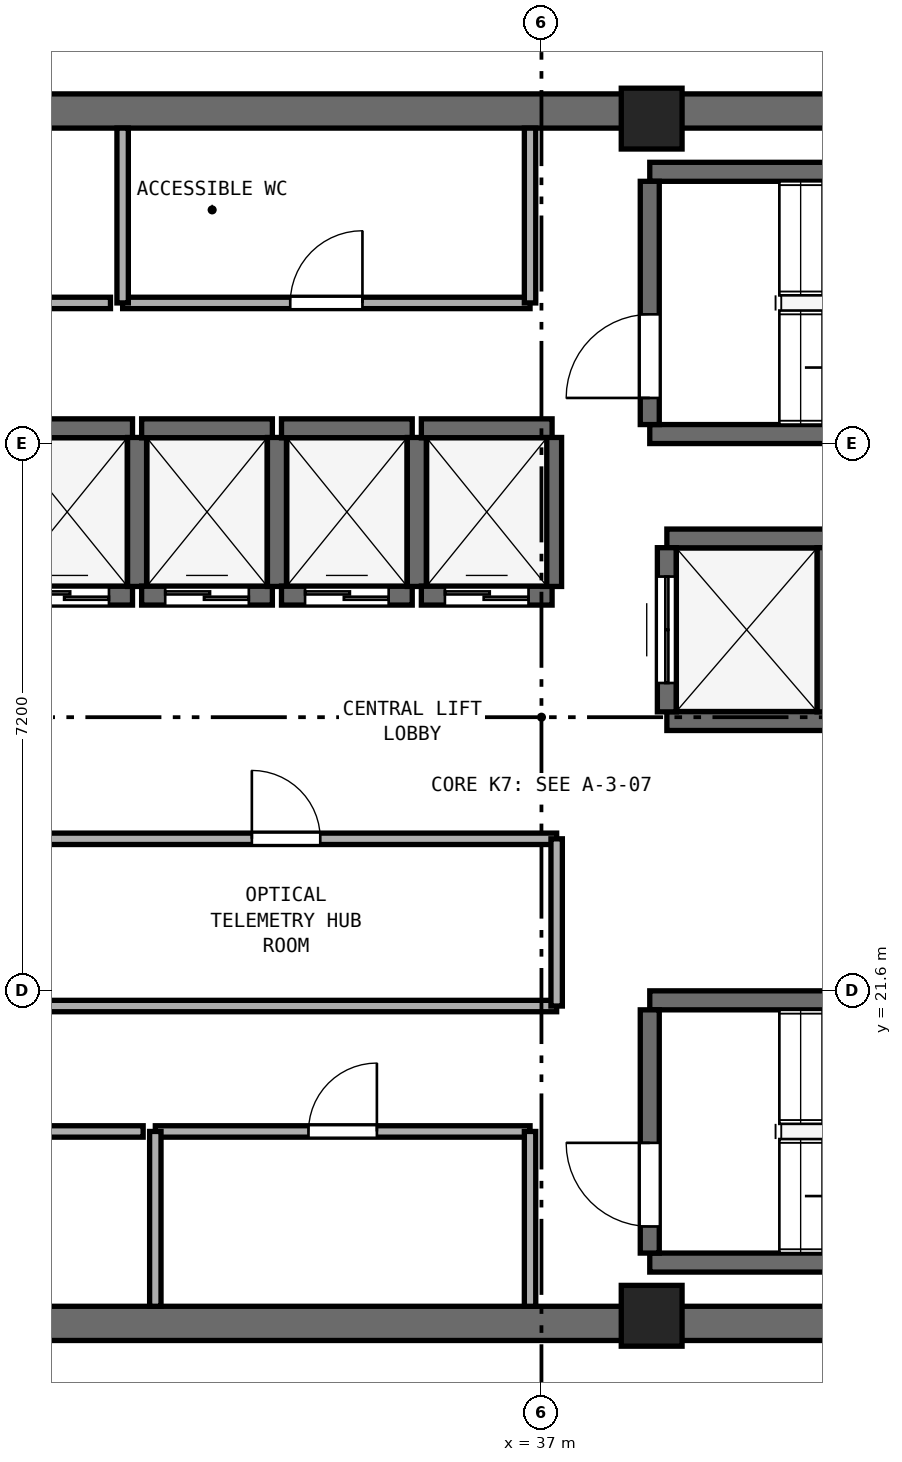
"""IFC4 building model, lengths in metres.
Left out: names, types, materials, properties, quantities, classifications, styles, units other than length and angle.
Written with IfcOpenShell. Run it as: python <this file> out.ifc"""

import sys

from ifc_helpers import new_model, si_unit, direction, frame, frame_2d, origin, origin_2d, place, context, subcontext, project, spatial, rectangle, extrude, element, fill, save


model = new_model("IFC4")
c1 = context("Model", 3, precision=1e-05, world=origin(), true_north=direction((0.0, 1.0)))
c2 = subcontext(c1, "Body", "Model", "MODEL_VIEW")
j1 = project(units=[si_unit("LENGTHUNIT", "METRE"), si_unit("PLANEANGLEUNIT", "RADIAN")], contexts=[c1])
p1 = place(None, origin())
s1 = spatial("IfcSite", under=j1, at=p1, CompositionType="ELEMENT")
p2 = place(p1, origin())
s2 = spatial("IfcBuilding", under=s1, at=p2, CompositionType="ELEMENT")
p3 = place(p2, frame((0.0, 0.0, 297.2)))
s3 = spatial("IfcBuildingStorey", under=s2, at=p3, CompositionType="ELEMENT", Elevation=297.2)
for number, where, z_axis, x_axis in (
    (1, (25.4, 17.225, 0.0), (0.0, 0.0, 1.0), (1.0, 0.0, 0.0)),
    (2, (25.4, 33.175, 0.0), (0.0, 0.0, 1.0), (1.0, 0.0, 0.0)),
):
    element("IfcWall", number, at=place(p3, frame(where, z_axis=z_axis, x_axis=x_axis)), inside=s3, PredefinedType="SHEAR", context=c2, shape_type="SweptSolid", body=[
        extrude(rectangle(XDim=23.2, YDim=0.45, at=frame_2d((11.6, 0.0))), origin(), (0.0, 0.0, 1.0), 3.54),
    ])
for number, where, z_axis, x_axis in (
    (3, (38.45, 17.325, 0.0), (0.0, 0.0, 1.0), (1.0, 0.0, 0.0)),
    (4, (38.45, 33.075, 0.0), (0.0, 0.0, 1.0), (1.0, 0.0, 0.0)),
):
    element("IfcColumn", number, at=place(p3, frame(where, z_axis=z_axis, x_axis=x_axis)), inside=s3, PredefinedType="PILASTER", context=c2, shape_type="SweptSolid", body=[
        extrude(rectangle(XDim=0.8, YDim=0.8, at=origin_2d()), origin(), (0.0, 0.0, 1.0), 3.8),
    ])
for number, where, z_axis, x_axis in (
    (5, (38.425, 28.925, 0.0), (0.0, 0.0, 1.0), (1.0, 0.0, 0.0)),
    (6, (38.425, 32.375, 0.0), (0.0, 0.0, 1.0), (1.0, 0.0, 0.0)),
):
    element("IfcWall", number, at=place(p3, frame(where, z_axis=z_axis, x_axis=x_axis)), inside=s3, PredefinedType="SHEAR", context=c2, shape_type="SweptSolid", body=[
        extrude(rectangle(XDim=7.3, YDim=0.25, at=frame_2d((3.65, 0.0))), origin(), (0.0, 0.0, 1.0), 3.54),
    ])
p4 = place(p3, frame((38.425, 29.05, 0.0), z_axis=(0.0, 0.0, 1.0), x_axis=(0.0, 1.0, 0.0)))
e7 = element("IfcWall", 7, at=p4, inside=s3, PredefinedType="SHEAR", context=c2, shape_type="SweptSolid", body=[
    extrude(rectangle(XDim=3.2, YDim=0.25, at=frame_2d((1.6, 0.0))), origin(), (0.0, 0.0, 1.0), 3.54),
])
p5 = place(p4, frame((0.35, 0.0, 0.0)))
e8 = element("IfcOpeningElement", 8, at=p5, cuts=e7, PredefinedType="OPENING", context=c2, shape_type="SweptSolid", body=[
    extrude(rectangle(XDim=1.1, YDim=2.15, at=frame_2d((0.55, 1.075))), frame((0.0, 0.135, 0.0), z_axis=(0.0, -1.0, 0.0), x_axis=(1.0, 0.0, 0.0)), (0.0, 0.0, 1.0), 0.27),
])
for number, where, z_axis, x_axis in (
    (9, (38.425, 18.025, 0.0), (0.0, 0.0, 1.0), (1.0, 0.0, 0.0)),
    (10, (38.425, 21.475, 0.0), (0.0, 0.0, 1.0), (1.0, 0.0, 0.0)),
):
    element("IfcWall", number, at=place(p3, frame(where, z_axis=z_axis, x_axis=x_axis)), inside=s3, PredefinedType="SHEAR", context=c2, shape_type="SweptSolid", body=[
        extrude(rectangle(XDim=7.3, YDim=0.25, at=frame_2d((3.65, 0.0))), origin(), (0.0, 0.0, 1.0), 3.54),
    ])
p6 = place(p3, frame((38.425, 18.15, 0.0), z_axis=(0.0, 0.0, 1.0), x_axis=(0.0, 1.0, 0.0)))
e11 = element("IfcWall", 11, at=p6, inside=s3, PredefinedType="SHEAR", context=c2, shape_type="SweptSolid", body=[
    extrude(rectangle(XDim=3.2, YDim=0.25, at=frame_2d((1.6, 0.0))), origin(), (0.0, 0.0, 1.0), 3.54),
])
p7 = place(p6, frame((0.35, 0.0, 0.0)))
e12 = element("IfcOpeningElement", 12, at=p7, cuts=e11, PredefinedType="OPENING", context=c2, shape_type="SweptSolid", body=[
    extrude(rectangle(XDim=1.1, YDim=2.15, at=frame_2d((0.55, 1.075))), frame((0.0, 0.135, 0.0), z_axis=(0.0, -1.0, 0.0), x_axis=(1.0, 0.0, 0.0)), (0.0, 0.0, 1.0), 0.27),
])
p8 = place(p3, frame((29.9, 26.8, 0.0), z_axis=(0.0, 0.0, 1.0), x_axis=(1.0, 0.0, 0.0)))
e13 = element("IfcWall", 13, at=p8, inside=s3, PredefinedType="SHEAR", context=c2, shape_type="SweptSolid", body=[
    extrude(rectangle(XDim=1.72, YDim=0.25, at=frame_2d((0.86, 0.0))), origin(), (0.0, 0.0, 1.0), 3.54),
])
p9 = place(p8, frame((0.31, 0.0, 0.0)))
e14 = element("IfcOpeningElement", 14, at=p9, cuts=e13, PredefinedType="OPENING", context=c2, shape_type="SweptSolid", body=[
    extrude(rectangle(XDim=1.1, YDim=2.15, at=frame_2d((0.55, 1.075))), frame((0.0, 0.135, 0.0), z_axis=(0.0, -1.0, 0.0), x_axis=(1.0, 0.0, 0.0)), (0.0, 0.0, 1.0), 0.27),
])
p10 = place(p3, frame((29.9, 29.0, 0.0), z_axis=(0.0, 0.0, 1.0), x_axis=(1.0, 0.0, 0.0)))
e15 = element("IfcWall", 15, at=p10, inside=s3, PredefinedType="SHEAR", context=c2, shape_type="SweptSolid", body=[
    extrude(rectangle(XDim=1.72, YDim=0.25, at=frame_2d((0.86, 0.0))), origin(), (0.0, 0.0, 1.0), 3.54),
])
p11 = place(p3, frame((31.68, 26.92, 0.0), z_axis=(0.0, 0.0, 1.0), x_axis=(0.0, 1.0, 0.0)))
e16 = element("IfcWall", 16, at=p11, inside=s3, PredefinedType="SHEAR", context=c2, shape_type="SweptSolid", body=[
    extrude(rectangle(XDim=1.96, YDim=0.25, at=frame_2d((0.98, 0.0))), origin(), (0.0, 0.0, 1.0), 3.54),
])
p12 = place(p3, frame((31.74, 26.8, 0.0), z_axis=(0.0, 0.0, 1.0), x_axis=(1.0, 0.0, 0.0)))
e17 = element("IfcWall", 17, at=p12, inside=s3, PredefinedType="SHEAR", context=c2, shape_type="SweptSolid", body=[
    extrude(rectangle(XDim=1.72, YDim=0.25, at=frame_2d((0.86, 0.0))), origin(), (0.0, 0.0, 1.0), 3.54),
])
p13 = place(p12, frame((0.31, 0.0, 0.0)))
e18 = element("IfcOpeningElement", 18, at=p13, cuts=e17, PredefinedType="OPENING", context=c2, shape_type="SweptSolid", body=[
    extrude(rectangle(XDim=1.1, YDim=2.15, at=frame_2d((0.55, 1.075))), frame((0.0, 0.135, 0.0), z_axis=(0.0, -1.0, 0.0), x_axis=(1.0, 0.0, 0.0)), (0.0, 0.0, 1.0), 0.27),
])
p14 = place(p3, frame((31.74, 29.0, 0.0), z_axis=(0.0, 0.0, 1.0), x_axis=(1.0, 0.0, 0.0)))
e19 = element("IfcWall", 19, at=p14, inside=s3, PredefinedType="SHEAR", context=c2, shape_type="SweptSolid", body=[
    extrude(rectangle(XDim=1.72, YDim=0.25, at=frame_2d((0.86, 0.0))), origin(), (0.0, 0.0, 1.0), 3.54),
])
p15 = place(p3, frame((33.52, 26.92, 0.0), z_axis=(0.0, 0.0, 1.0), x_axis=(0.0, 1.0, 0.0)))
e20 = element("IfcWall", 20, at=p15, inside=s3, PredefinedType="SHEAR", context=c2, shape_type="SweptSolid", body=[
    extrude(rectangle(XDim=1.96, YDim=0.25, at=frame_2d((0.98, 0.0))), origin(), (0.0, 0.0, 1.0), 3.54),
])
p16 = place(p3, frame((33.58, 26.8, 0.0), z_axis=(0.0, 0.0, 1.0), x_axis=(1.0, 0.0, 0.0)))
e21 = element("IfcWall", 21, at=p16, inside=s3, PredefinedType="SHEAR", context=c2, shape_type="SweptSolid", body=[
    extrude(rectangle(XDim=1.72, YDim=0.25, at=frame_2d((0.86, 0.0))), origin(), (0.0, 0.0, 1.0), 3.54),
])
p17 = place(p16, frame((0.31, 0.0, 0.0)))
e22 = element("IfcOpeningElement", 22, at=p17, cuts=e21, PredefinedType="OPENING", context=c2, shape_type="SweptSolid", body=[
    extrude(rectangle(XDim=1.1, YDim=2.15, at=frame_2d((0.55, 1.075))), frame((0.0, 0.135, 0.0), z_axis=(0.0, -1.0, 0.0), x_axis=(1.0, 0.0, 0.0)), (0.0, 0.0, 1.0), 0.27),
])
p18 = place(p3, frame((33.58, 29.0, 0.0), z_axis=(0.0, 0.0, 1.0), x_axis=(1.0, 0.0, 0.0)))
e23 = element("IfcWall", 23, at=p18, inside=s3, PredefinedType="SHEAR", context=c2, shape_type="SweptSolid", body=[
    extrude(rectangle(XDim=1.72, YDim=0.25, at=frame_2d((0.86, 0.0))), origin(), (0.0, 0.0, 1.0), 3.54),
])
p19 = place(p3, frame((35.36, 26.92, 0.0), z_axis=(0.0, 0.0, 1.0), x_axis=(0.0, 1.0, 0.0)))
e24 = element("IfcWall", 24, at=p19, inside=s3, PredefinedType="SHEAR", context=c2, shape_type="SweptSolid", body=[
    extrude(rectangle(XDim=1.96, YDim=0.25, at=frame_2d((0.98, 0.0))), origin(), (0.0, 0.0, 1.0), 3.54),
])
p20 = place(p3, frame((35.42, 26.8, 0.0), z_axis=(0.0, 0.0, 1.0), x_axis=(1.0, 0.0, 0.0)))
e25 = element("IfcWall", 25, at=p20, inside=s3, PredefinedType="SHEAR", context=c2, shape_type="SweptSolid", body=[
    extrude(rectangle(XDim=1.72, YDim=0.25, at=frame_2d((0.86, 0.0))), origin(), (0.0, 0.0, 1.0), 3.54),
])
p21 = place(p20, frame((0.31, 0.0, 0.0)))
e26 = element("IfcOpeningElement", 26, at=p21, cuts=e25, PredefinedType="OPENING", context=c2, shape_type="SweptSolid", body=[
    extrude(rectangle(XDim=1.1, YDim=2.15, at=frame_2d((0.55, 1.075))), frame((0.0, 0.135, 0.0), z_axis=(0.0, -1.0, 0.0), x_axis=(1.0, 0.0, 0.0)), (0.0, 0.0, 1.0), 0.27),
])
p22 = place(p3, frame((35.42, 29.0, 0.0), z_axis=(0.0, 0.0, 1.0), x_axis=(1.0, 0.0, 0.0)))
e27 = element("IfcWall", 27, at=p22, inside=s3, PredefinedType="SHEAR", context=c2, shape_type="SweptSolid", body=[
    extrude(rectangle(XDim=1.72, YDim=0.25, at=frame_2d((0.86, 0.0))), origin(), (0.0, 0.0, 1.0), 3.54),
])
p23 = place(p3, frame((37.14, 26.92, 0.0), z_axis=(0.0, 0.0, 1.0), x_axis=(0.0, 1.0, 0.0)))
e28 = element("IfcWall", 28, at=p23, inside=s3, PredefinedType="SHEAR", context=c2, shape_type="SweptSolid", body=[
    extrude(rectangle(XDim=1.96, YDim=0.25, at=frame_2d((0.98, 0.0))), origin(), (0.0, 0.0, 1.0), 3.54),
])
for number, where, z_axis, x_axis in (
    (29, (38.65, 25.15, 0.0), (0.0, 0.0, 1.0), (1.0, 0.0, 0.0)),
    (30, (38.65, 27.55, 0.0), (0.0, 0.0, 1.0), (1.0, 0.0, 0.0)),
):
    element("IfcWall", number, at=place(p3, frame(where, z_axis=z_axis, x_axis=x_axis)), inside=s3, PredefinedType="SHEAR", context=c2, shape_type="SweptSolid", body=[
        extrude(rectangle(XDim=2.1, YDim=0.25, at=frame_2d((1.05, 0.0))), origin(), (0.0, 0.0, 1.0), 3.54),
    ])
p24 = place(p3, frame((38.65, 25.27, 0.0), z_axis=(0.0, 0.0, 1.0), x_axis=(0.0, 1.0, 0.0)))
e31 = element("IfcWall", 31, at=p24, inside=s3, PredefinedType="SHEAR", context=c2, shape_type="SweptSolid", body=[
    extrude(rectangle(XDim=2.16, YDim=0.25, at=frame_2d((1.08, 0.0))), origin(), (0.0, 0.0, 1.0), 3.54),
])
p25 = place(p24, frame((0.38, 0.0, 0.0)))
e32 = element("IfcOpeningElement", 32, at=p25, cuts=e31, PredefinedType="OPENING", context=c2, shape_type="SweptSolid", body=[
    extrude(rectangle(XDim=1.4, YDim=2.2, at=frame_2d((0.7, 1.1))), frame((0.0, 0.135, 0.0), z_axis=(0.0, -1.0, 0.0), x_axis=(1.0, 0.0, 0.0)), (0.0, 0.0, 1.0), 0.27),
])
p26 = place(p3, frame((40.75, 25.27, 0.0), z_axis=(0.0, 0.0, 1.0), x_axis=(0.0, 1.0, 0.0)))
e33 = element("IfcWall", 33, at=p26, inside=s3, PredefinedType="SHEAR", context=c2, shape_type="SweptSolid", body=[
    extrude(rectangle(XDim=2.16, YDim=0.25, at=frame_2d((1.08, 0.0))), origin(), (0.0, 0.0, 1.0), 3.54),
])
p27 = place(p3, frame((25.97, 30.65, 0.0), z_axis=(0.0, 0.0, 1.0), x_axis=(1.0, 0.0, 0.0)))
e34 = element("IfcWall", 34, at=p27, inside=s3, PredefinedType="PARTITIONING", context=c2, shape_type="SweptSolid", body=[
    extrude(rectangle(XDim=5.36, YDim=0.15, at=frame_2d((2.68, 0.0))), origin(), (0.0, 0.0, 1.0), 3.54),
])
p28 = place(p27, frame((2.205, 0.0, 0.0)))
e35 = element("IfcOpeningElement", 35, at=p28, cuts=e34, PredefinedType="OPENING", context=c2, shape_type="SweptSolid", body=[
    extrude(rectangle(XDim=0.95, YDim=2.1, at=frame_2d((0.475, 1.05))), frame((0.0, 0.085, 0.0), z_axis=(0.0, -1.0, 0.0), x_axis=(1.0, 0.0, 0.0)), (0.0, 0.0, 1.0), 0.17),
])
p29 = place(p3, frame((31.49, 30.65, 0.0), z_axis=(0.0, 0.0, 1.0), x_axis=(1.0, 0.0, 0.0)))
e36 = element("IfcWall", 36, at=p29, inside=s3, PredefinedType="PARTITIONING", context=c2, shape_type="SweptSolid", body=[
    extrude(rectangle(XDim=5.36, YDim=0.15, at=frame_2d((2.68, 0.0))), origin(), (0.0, 0.0, 1.0), 3.54),
])
p30 = place(p29, frame((2.205, 0.0, 0.0)))
e37 = element("IfcOpeningElement", 37, at=p30, cuts=e36, PredefinedType="OPENING", context=c2, shape_type="SweptSolid", body=[
    extrude(rectangle(XDim=0.95, YDim=2.1, at=frame_2d((0.475, 1.05))), frame((0.0, 0.085, 0.0), z_axis=(0.0, -1.0, 0.0), x_axis=(1.0, 0.0, 0.0)), (0.0, 0.0, 1.0), 0.17),
])
for number, where, z_axis, x_axis in (
    (38, (31.49, 30.65, 0.0), (0.0, 0.0, 1.0), (0.0, 1.0, 0.0)),
    (39, (36.85, 30.65, 0.0), (0.0, 0.0, 1.0), (0.0, 1.0, 0.0)),
):
    element("IfcWall", number, at=place(p3, frame(where, z_axis=z_axis, x_axis=x_axis)), inside=s3, PredefinedType="PARTITIONING", context=c2, shape_type="SweptSolid", body=[
        extrude(rectangle(XDim=2.3, YDim=0.15, at=frame_2d((1.15, 0.0))), origin(), (0.0, 0.0, 1.0), 3.54),
    ])
p31 = place(p3, frame((25.97, 19.75, 0.0), z_axis=(0.0, 0.0, 1.0), x_axis=(1.0, 0.0, 0.0)))
e40 = element("IfcWall", 40, at=p31, inside=s3, PredefinedType="PARTITIONING", context=c2, shape_type="SweptSolid", body=[
    extrude(rectangle(XDim=5.79, YDim=0.15, at=frame_2d((2.895, 0.0))), origin(), (0.0, 0.0, 1.0), 3.54),
])
p32 = place(p31, frame((2.42, 0.0, 0.0)))
e41 = element("IfcOpeningElement", 41, at=p32, cuts=e40, PredefinedType="OPENING", context=c2, shape_type="SweptSolid", body=[
    extrude(rectangle(XDim=0.95, YDim=2.1, at=frame_2d((0.475, 1.05))), frame((0.0, 0.085, 0.0), z_axis=(0.0, -1.0, 0.0), x_axis=(1.0, 0.0, 0.0)), (0.0, 0.0, 1.0), 0.17),
])
p33 = place(p3, frame((31.92, 19.75, 0.0), z_axis=(0.0, 0.0, 1.0), x_axis=(1.0, 0.0, 0.0)))
e42 = element("IfcWall", 42, at=p33, inside=s3, PredefinedType="PARTITIONING", context=c2, shape_type="SweptSolid", body=[
    extrude(rectangle(XDim=4.93, YDim=0.15, at=frame_2d((2.465, 0.0))), origin(), (0.0, 0.0, 1.0), 3.54),
])
p34 = place(p33, frame((2.015, 0.0, 0.0)))
e43 = element("IfcOpeningElement", 43, at=p34, cuts=e42, PredefinedType="OPENING", context=c2, shape_type="SweptSolid", body=[
    extrude(rectangle(XDim=0.9, YDim=2.1, at=frame_2d((0.45, 1.05))), frame((0.0, 0.085, 0.0), z_axis=(0.0, -1.0, 0.0), x_axis=(1.0, 0.0, 0.0)), (0.0, 0.0, 1.0), 0.17),
])
for number, where, z_axis, x_axis in (
    (44, (31.92, 17.45, 0.0), (0.0, 0.0, 1.0), (0.0, 1.0, 0.0)),
    (45, (36.85, 17.45, 0.0), (0.0, 0.0, 1.0), (0.0, 1.0, 0.0)),
):
    element("IfcWall", number, at=place(p3, frame(where, z_axis=z_axis, x_axis=x_axis)), inside=s3, PredefinedType="PARTITIONING", context=c2, shape_type="SweptSolid", body=[
        extrude(rectangle(XDim=2.3, YDim=0.15, at=frame_2d((1.15, 0.0))), origin(), (0.0, 0.0, 1.0), 3.54),
    ])
p35 = place(p3, frame((30.08, 21.4, 0.0), z_axis=(0.0, 0.0, 1.0), x_axis=(1.0, 0.0, 0.0)))
e46 = element("IfcWall", 46, at=p35, inside=s3, PredefinedType="PARTITIONING", context=c2, shape_type="SweptSolid", body=[
    extrude(rectangle(XDim=7.12, YDim=0.15, at=frame_2d((3.56, 0.0))), origin(), (0.0, 0.0, 1.0), 3.54),
])
p36 = place(p3, frame((30.08, 23.6, 0.0), z_axis=(0.0, 0.0, 1.0), x_axis=(1.0, 0.0, 0.0)))
e47 = element("IfcWall", 47, at=p36, inside=s3, PredefinedType="PARTITIONING", context=c2, shape_type="SweptSolid", body=[
    extrude(rectangle(XDim=7.12, YDim=0.15, at=frame_2d((3.56, 0.0))), origin(), (0.0, 0.0, 1.0), 3.54),
])
p37 = place(p36, frame((3.11, 0.0, 0.0)))
e48 = element("IfcOpeningElement", 48, at=p37, cuts=e47, PredefinedType="OPENING", context=c2, shape_type="SweptSolid", body=[
    extrude(rectangle(XDim=0.9, YDim=2.1, at=frame_2d((0.45, 1.05))), frame((0.0, 0.085, 0.0), z_axis=(0.0, -1.0, 0.0), x_axis=(1.0, 0.0, 0.0)), (0.0, 0.0, 1.0), 0.17),
])
p38 = place(p3, frame((37.2, 21.4, 0.0), z_axis=(0.0, 0.0, 1.0), x_axis=(0.0, 1.0, 0.0)))
e49 = element("IfcWall", 49, at=p38, inside=s3, PredefinedType="PARTITIONING", context=c2, shape_type="SweptSolid", body=[
    extrude(rectangle(XDim=2.2, YDim=0.15, at=frame_2d((1.1, 0.0))), origin(), (0.0, 0.0, 1.0), 3.54),
])
p39 = place(p5, origin())
e50 = element("IfcDoor", 50, at=p39, inside=s3, OperationType="SINGLE_SWING_LEFT", PredefinedType="DOOR", context=c2, shape_type="SweptSolid", body=[
    extrude(rectangle(XDim=1.1, YDim=2.15, at=frame_2d((0.55, 1.075))), frame((0.0, 0.025, 0.0), z_axis=(0.0, -1.0, 0.0), x_axis=(1.0, 0.0, 0.0)), (0.0, 0.0, 1.0), 0.05),
])
fill(e8, e50)
p40 = place(p7, origin())
e51 = element("IfcDoor", 51, at=p40, inside=s3, OperationType="SINGLE_SWING_RIGHT", PredefinedType="DOOR", context=c2, shape_type="SweptSolid", body=[
    extrude(rectangle(XDim=1.1, YDim=2.15, at=frame_2d((0.55, 1.075))), frame((0.0, 0.025, 0.0), z_axis=(0.0, -1.0, 0.0), x_axis=(1.0, 0.0, 0.0)), (0.0, 0.0, 1.0), 0.05),
])
fill(e12, e51)
p41 = place(p9, origin())
e52 = element("IfcDoor", 52, at=p41, inside=s3, OperationType="DOUBLE_DOOR_SLIDING", PredefinedType="DOOR", context=c2, shape_type="SweptSolid", body=[
    extrude(rectangle(XDim=1.1, YDim=2.15, at=frame_2d((0.55, 1.075))), frame((0.0, 0.025, 0.0), z_axis=(0.0, -1.0, 0.0), x_axis=(1.0, 0.0, 0.0)), (0.0, 0.0, 1.0), 0.05),
])
fill(e14, e52)
p42 = place(p13, origin())
e53 = element("IfcDoor", 53, at=p42, inside=s3, OperationType="DOUBLE_DOOR_SLIDING", PredefinedType="DOOR", context=c2, shape_type="SweptSolid", body=[
    extrude(rectangle(XDim=1.1, YDim=2.15, at=frame_2d((0.55, 1.075))), frame((0.0, 0.025, 0.0), z_axis=(0.0, -1.0, 0.0), x_axis=(1.0, 0.0, 0.0)), (0.0, 0.0, 1.0), 0.05),
])
fill(e18, e53)
p43 = place(p17, origin())
e54 = element("IfcDoor", 54, at=p43, inside=s3, OperationType="DOUBLE_DOOR_SLIDING", PredefinedType="DOOR", context=c2, shape_type="SweptSolid", body=[
    extrude(rectangle(XDim=1.1, YDim=2.15, at=frame_2d((0.55, 1.075))), frame((0.0, 0.025, 0.0), z_axis=(0.0, -1.0, 0.0), x_axis=(1.0, 0.0, 0.0)), (0.0, 0.0, 1.0), 0.05),
])
fill(e22, e54)
p44 = place(p21, origin())
e55 = element("IfcDoor", 55, at=p44, inside=s3, OperationType="DOUBLE_DOOR_SLIDING", PredefinedType="DOOR", context=c2, shape_type="SweptSolid", body=[
    extrude(rectangle(XDim=1.1, YDim=2.15, at=frame_2d((0.55, 1.075))), frame((0.0, 0.025, 0.0), z_axis=(0.0, -1.0, 0.0), x_axis=(1.0, 0.0, 0.0)), (0.0, 0.0, 1.0), 0.05),
])
fill(e26, e55)
p45 = place(p25, origin())
e56 = element("IfcDoor", 56, at=p45, inside=s3, OperationType="DOUBLE_DOOR_SLIDING", PredefinedType="DOOR", context=c2, shape_type="SweptSolid", body=[
    extrude(rectangle(XDim=1.4, YDim=2.2, at=frame_2d((0.7, 1.1))), frame((0.0, 0.025, 0.0), z_axis=(0.0, -1.0, 0.0), x_axis=(1.0, 0.0, 0.0)), (0.0, 0.0, 1.0), 0.05),
])
fill(e32, e56)
p46 = place(p30, origin())
e57 = element("IfcDoor", 57, at=p46, inside=s3, OperationType="SINGLE_SWING_RIGHT", PredefinedType="DOOR", context=c2, shape_type="SweptSolid", body=[
    extrude(rectangle(XDim=0.95, YDim=2.1, at=frame_2d((0.475, 1.05))), frame((0.0, 0.025, 0.0), z_axis=(0.0, -1.0, 0.0), x_axis=(1.0, 0.0, 0.0)), (0.0, 0.0, 1.0), 0.05),
])
fill(e37, e57)
p47 = place(p34, origin())
e58 = element("IfcDoor", 58, at=p47, inside=s3, OperationType="SINGLE_SWING_RIGHT", PredefinedType="DOOR", context=c2, shape_type="SweptSolid", body=[
    extrude(rectangle(XDim=0.9, YDim=2.1, at=frame_2d((0.45, 1.05))), frame((0.0, 0.025, 0.0), z_axis=(0.0, -1.0, 0.0), x_axis=(1.0, 0.0, 0.0)), (0.0, 0.0, 1.0), 0.05),
])
fill(e43, e58)
p48 = place(p37, origin())
e59 = element("IfcDoor", 59, at=p48, inside=s3, OperationType="SINGLE_SWING_LEFT", PredefinedType="DOOR", context=c2, shape_type="SweptSolid", body=[
    extrude(rectangle(XDim=0.9, YDim=2.1, at=frame_2d((0.45, 1.05))), frame((0.0, 0.025, 0.0), z_axis=(0.0, -1.0, 0.0), x_axis=(1.0, 0.0, 0.0)), (0.0, 0.0, 1.0), 0.05),
])
fill(e48, e59)
save(model, sys.argv[1])
